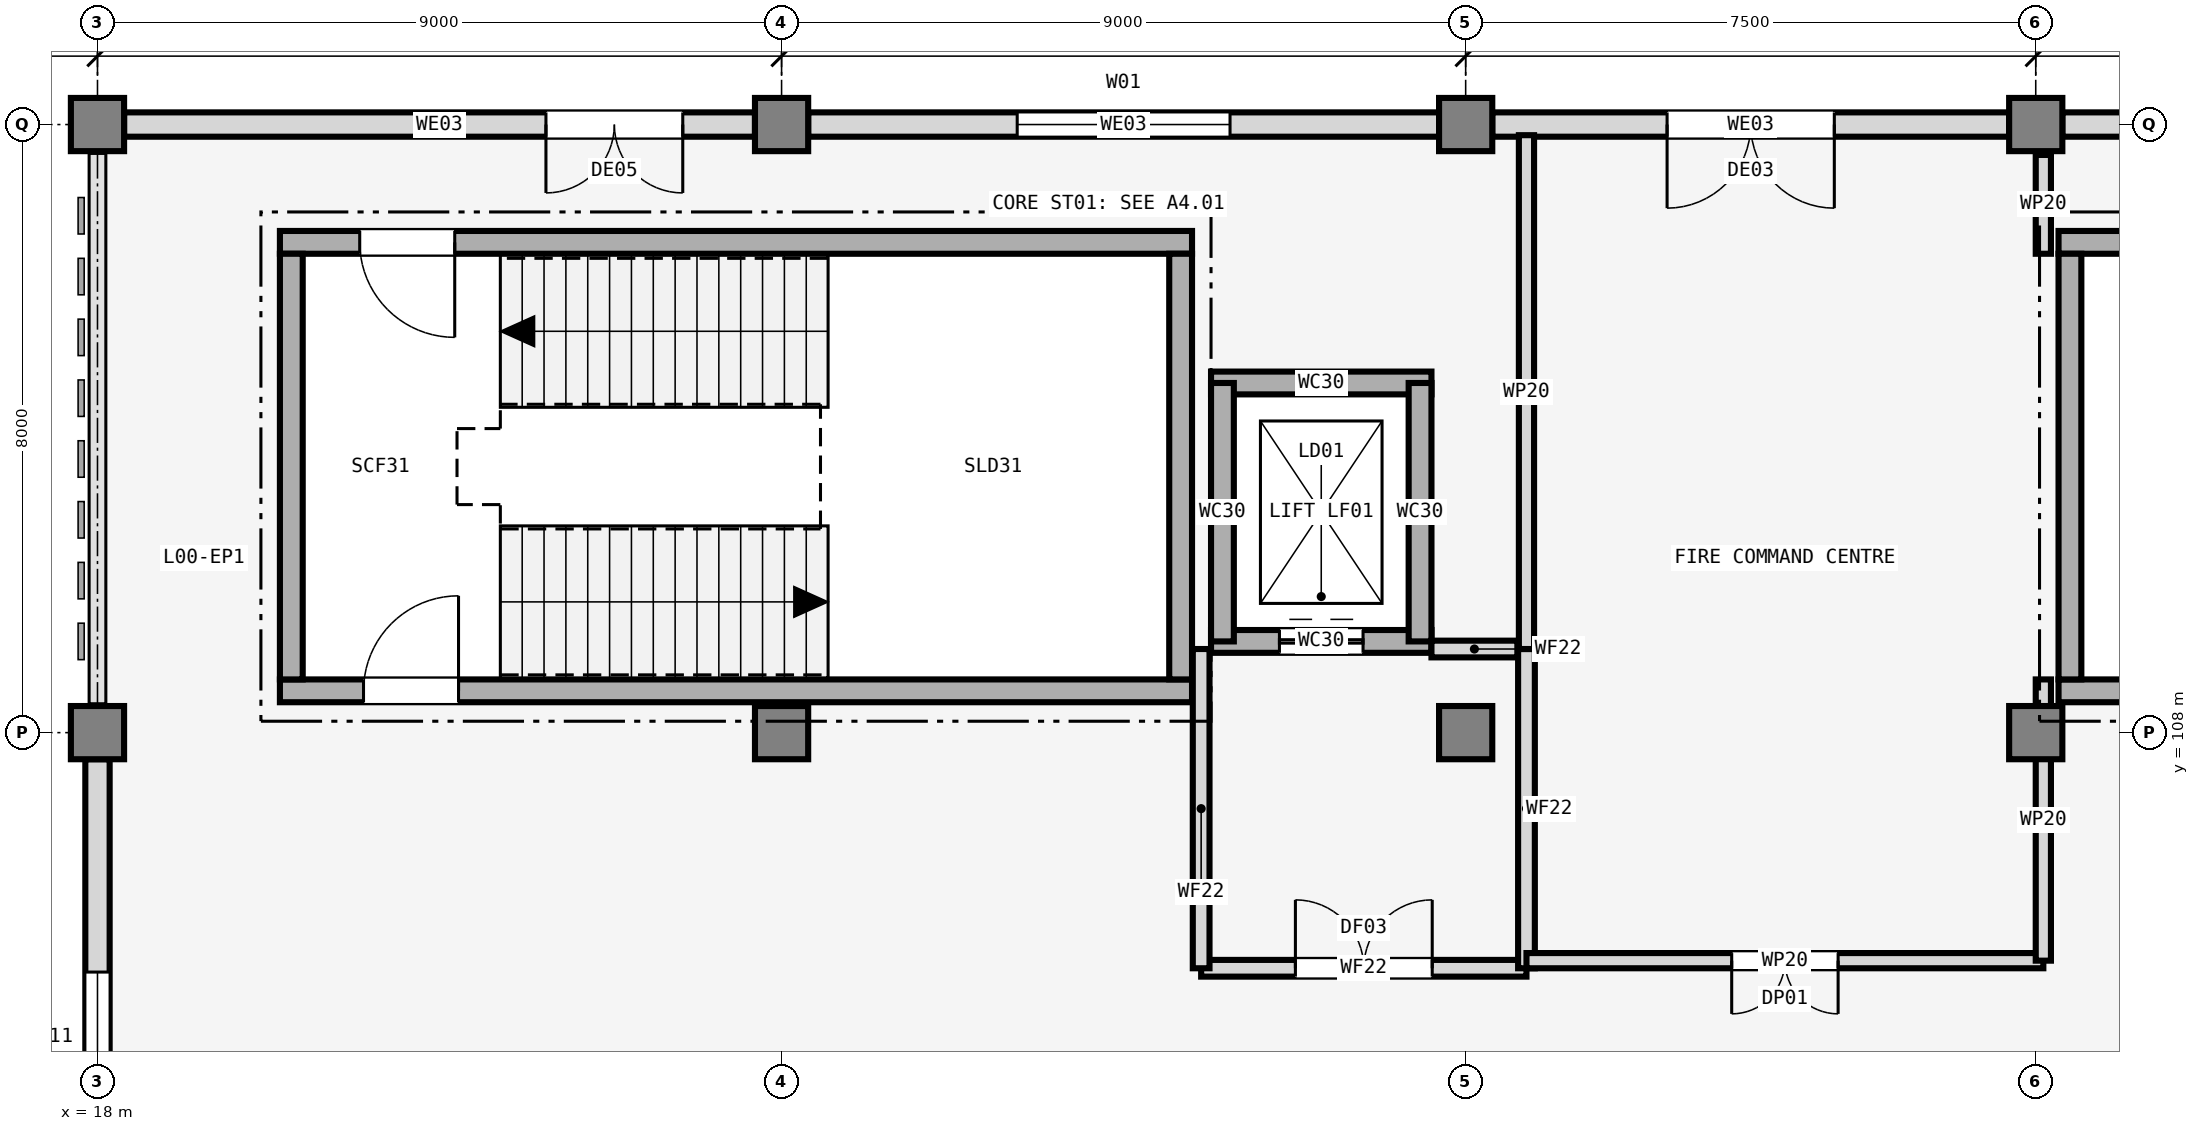
"""IFC4 building model, lengths in metres.
Left out: names, types, materials, properties, quantities, classifications, styles, units other than length and angle.
Written with IfcOpenShell. Run it as: python <this file> out.ifc"""

import sys

from ifc_helpers import new_model, si_unit, direction, frame, frame_2d, origin, origin_2d, place, context, subcontext, project, spatial, rectangle, extrude, element, fill, save


model = new_model("IFC4")
c1 = context("Model", 3, precision=1e-05, world=origin(), true_north=direction((0.0, 1.0)))
c2 = subcontext(c1, "Body", "Model", "MODEL_VIEW")
j1 = project(units=[si_unit("LENGTHUNIT", "METRE"), si_unit("PLANEANGLEUNIT", "RADIAN")], contexts=[c1])
p1 = place(None, origin())
s1 = spatial("IfcSite", under=j1, at=p1, CompositionType="ELEMENT")
p2 = place(p1, origin())
s2 = spatial("IfcBuilding", under=s1, at=p2, CompositionType="ELEMENT")
p3 = place(p2, origin())
s3 = spatial("IfcBuildingStorey", under=s2, at=p3, CompositionType="ELEMENT", Elevation=0.0)
for number, where, z_axis, x_axis in (
    (1, (18.0, 108.0, 0.0), (0.0, 0.0, 1.0), (1.0, 0.0, 0.0)),
    (2, (18.0, 116.0, 0.0), (0.0, 0.0, 1.0), (1.0, 0.0, 0.0)),
    (3, (27.0, 108.0, 0.0), (0.0, 0.0, 1.0), (1.0, 0.0, 0.0)),
    (4, (27.0, 116.0, 0.0), (0.0, 0.0, 1.0), (1.0, 0.0, 0.0)),
    (5, (36.0, 108.0, 0.0), (0.0, 0.0, 1.0), (1.0, 0.0, 0.0)),
    (6, (36.0, 116.0, 0.0), (0.0, 0.0, 1.0), (1.0, 0.0, 0.0)),
    (7, (43.5, 108.0, 0.0), (0.0, 0.0, 1.0), (1.0, 0.0, 0.0)),
    (8, (43.5, 116.0, 0.0), (0.0, 0.0, 1.0), (1.0, 0.0, 0.0)),
):
    element("IfcColumn", number, at=place(p3, frame(where, z_axis=z_axis, x_axis=x_axis)), inside=s3, PredefinedType="COLUMN", context=c2, shape_type="SweptSolid", body=[
        extrude(rectangle(XDim=0.7, YDim=0.7, at=origin_2d()), origin(), (0.0, 0.0, 1.0), 4.8),
    ])
p4 = place(p3, frame((26.65, 116.0, 0.0), z_axis=(0.0, 0.0, 1.0), x_axis=(-1.0, 0.0, 0.0)))
e9 = element("IfcWall", 9, at=p4, inside=s3, PredefinedType="SOLIDWALL", context=c2, shape_type="SweptSolid", body=[
    extrude(rectangle(XDim=8.3, YDim=0.32, at=frame_2d((4.15, 0.0))), origin(), (0.0, 0.0, 1.0), 3.93),
])
p5 = place(p4, frame((0.95, 0.0, 0.0)))
e10 = element("IfcOpeningElement", 10, at=p5, cuts=e9, PredefinedType="OPENING", context=c2, shape_type="SweptSolid", body=[
    extrude(rectangle(XDim=1.8, YDim=2.2, at=frame_2d((0.9, 1.1))), frame((0.0, 0.17, 0.0), z_axis=(0.0, -1.0, 0.0), x_axis=(1.0, 0.0, 0.0)), (0.0, 0.0, 1.0), 0.34),
])
p6 = place(p3, frame((35.65, 116.0, 0.0), z_axis=(0.0, 0.0, 1.0), x_axis=(-1.0, 0.0, 0.0)))
e11 = element("IfcWall", 11, at=p6, inside=s3, PredefinedType="SOLIDWALL", context=c2, shape_type="SweptSolid", body=[
    extrude(rectangle(XDim=8.3, YDim=0.32, at=frame_2d((4.15, 0.0))), origin(), (0.0, 0.0, 1.0), 3.93),
])
p7 = place(p6, frame((2.75, 0.0, 0.95)))
e12 = element("IfcOpeningElement", 12, at=p7, cuts=e11, PredefinedType="OPENING", context=c2, shape_type="SweptSolid", body=[
    extrude(rectangle(XDim=2.8, YDim=1.85, at=frame_2d((1.4, 0.925))), frame((0.0, 0.17, 0.0), z_axis=(0.0, -1.0, 0.0), x_axis=(1.0, 0.0, 0.0)), (0.0, 0.0, 1.0), 0.34),
])
p8 = place(p3, frame((43.15, 116.0, 0.0), z_axis=(0.0, 0.0, 1.0), x_axis=(-1.0, 0.0, 0.0)))
e13 = element("IfcWall", 13, at=p8, inside=s3, PredefinedType="SOLIDWALL", context=c2, shape_type="SweptSolid", body=[
    extrude(rectangle(XDim=6.8, YDim=0.32, at=frame_2d((3.4, 0.0))), origin(), (0.0, 0.0, 1.0), 3.93),
])
p9 = place(p8, frame((2.3, 0.0, 0.0)))
e14 = element("IfcOpeningElement", 14, at=p9, cuts=e13, PredefinedType="OPENING", context=c2, shape_type="SweptSolid", body=[
    extrude(rectangle(XDim=2.2, YDim=2.35, at=frame_2d((1.1, 1.175))), frame((0.0, 0.17, 0.0), z_axis=(0.0, -1.0, 0.0), x_axis=(1.0, 0.0, 0.0)), (0.0, 0.0, 1.0), 0.34),
])
p10 = place(p3, frame((50.65, 116.0, 0.0), z_axis=(0.0, 0.0, 1.0), x_axis=(-1.0, 0.0, 0.0)))
e15 = element("IfcWall", 15, at=p10, inside=s3, PredefinedType="SOLIDWALL", context=c2, shape_type="SweptSolid", body=[
    extrude(rectangle(XDim=6.8, YDim=0.32, at=frame_2d((3.4, 0.0))), origin(), (0.0, 0.0, 1.0), 3.93),
])
p11 = place(p10, frame((2.2, 0.0, 0.95)))
e16 = element("IfcOpeningElement", 16, at=p11, cuts=e15, PredefinedType="OPENING", context=c2, shape_type="SweptSolid", body=[
    extrude(rectangle(XDim=2.4, YDim=1.6, at=frame_2d((1.2, 0.8))), frame((0.0, 0.17, 0.0), z_axis=(0.0, -1.0, 0.0), x_axis=(1.0, 0.0, 0.0)), (0.0, 0.0, 1.0), 0.34),
])
p12 = place(p3, frame((18.0, 107.65, 0.0), z_axis=(0.0, 0.0, 1.0), x_axis=(0.0, -1.0, 0.0)))
e17 = element("IfcWall", 17, at=p12, inside=s3, PredefinedType="SOLIDWALL", context=c2, shape_type="SweptSolid", body=[
    extrude(rectangle(XDim=7.3, YDim=0.32, at=frame_2d((3.65, 0.0))), origin(), (0.0, 0.0, 1.0), 3.73),
])
p13 = place(p12, frame((2.8, 0.0, 0.95)))
e18 = element("IfcOpeningElement", 18, at=p13, cuts=e17, PredefinedType="OPENING", context=c2, shape_type="SweptSolid", body=[
    extrude(rectangle(XDim=1.7, YDim=1.55, at=frame_2d((0.85, 0.775))), frame((0.0, 0.17, 0.0), z_axis=(0.0, -1.0, 0.0), x_axis=(1.0, 0.0, 0.0)), (0.0, 0.0, 1.0), 0.34),
])
p14 = place(p3, frame((20.4, 108.55, 0.0), z_axis=(0.0, 0.0, 1.0), x_axis=(1.0, 0.0, 0.0)))
e19 = element("IfcWall", 19, at=p14, inside=s3, PredefinedType="SHEAR", context=c2, shape_type="SweptSolid", body=[
    extrude(rectangle(XDim=12.0, YDim=0.3, at=frame_2d((6.0, 0.0))), origin(), (0.0, 0.0, 1.0), 4.8),
])
p15 = place(p14, frame((1.1, 0.0, 0.0)))
e20 = element("IfcOpeningElement", 20, at=p15, cuts=e19, PredefinedType="OPENING", context=c2, shape_type="SweptSolid", body=[
    extrude(rectangle(XDim=1.25, YDim=2.15, at=frame_2d((0.625, 1.075))), frame((0.0, 0.16, 0.0), z_axis=(0.0, -1.0, 0.0), x_axis=(1.0, 0.0, 0.0)), (0.0, 0.0, 1.0), 0.32),
])
p16 = place(p3, frame((32.4, 114.45, 0.0), z_axis=(0.0, 0.0, 1.0), x_axis=(-1.0, 0.0, 0.0)))
e21 = element("IfcWall", 21, at=p16, inside=s3, PredefinedType="SHEAR", context=c2, shape_type="SweptSolid", body=[
    extrude(rectangle(XDim=12.0, YDim=0.3, at=frame_2d((6.0, 0.0))), origin(), (0.0, 0.0, 1.0), 4.8),
])
p17 = place(p16, frame((9.7, 0.0, 0.0)))
e22 = element("IfcOpeningElement", 22, at=p17, cuts=e21, PredefinedType="OPENING", context=c2, shape_type="SweptSolid", body=[
    extrude(rectangle(XDim=1.25, YDim=2.15, at=frame_2d((0.625, 1.075))), frame((0.0, 0.16, 0.0), z_axis=(0.0, -1.0, 0.0), x_axis=(1.0, 0.0, 0.0)), (0.0, 0.0, 1.0), 0.32),
])
for number, where, z_axis, x_axis in (
    (23, (20.55, 114.3, 0.0), (0.0, 0.0, 1.0), (0.0, -1.0, 0.0)),
    (24, (32.25, 108.7, 0.0), (0.0, 0.0, 1.0), (0.0, 1.0, 0.0)),
):
    element("IfcWall", number, at=place(p3, frame(where, z_axis=z_axis, x_axis=x_axis)), inside=s3, PredefinedType="SHEAR", context=c2, shape_type="SweptSolid", body=[
        extrude(rectangle(XDim=5.6, YDim=0.3, at=frame_2d((2.8, 0.0))), origin(), (0.0, 0.0, 1.0), 4.8),
    ])
p18 = place(p3, frame((43.8, 108.55, 0.0), z_axis=(0.0, 0.0, 1.0), x_axis=(1.0, 0.0, 0.0)))
e25 = element("IfcWall", 25, at=p18, inside=s3, PredefinedType="SHEAR", context=c2, shape_type="SweptSolid", body=[
    extrude(rectangle(XDim=12.0, YDim=0.3, at=frame_2d((6.0, 0.0))), origin(), (0.0, 0.0, 1.0), 4.8),
])
p19 = place(p18, frame((1.1, 0.0, 0.0)))
e26 = element("IfcOpeningElement", 26, at=p19, cuts=e25, PredefinedType="OPENING", context=c2, shape_type="SweptSolid", body=[
    extrude(rectangle(XDim=1.25, YDim=2.15, at=frame_2d((0.625, 1.075))), frame((0.0, 0.16, 0.0), z_axis=(0.0, -1.0, 0.0), x_axis=(1.0, 0.0, 0.0)), (0.0, 0.0, 1.0), 0.32),
])
p20 = place(p3, frame((55.8, 114.45, 0.0), z_axis=(0.0, 0.0, 1.0), x_axis=(-1.0, 0.0, 0.0)))
e27 = element("IfcWall", 27, at=p20, inside=s3, PredefinedType="SHEAR", context=c2, shape_type="SweptSolid", body=[
    extrude(rectangle(XDim=12.0, YDim=0.3, at=frame_2d((6.0, 0.0))), origin(), (0.0, 0.0, 1.0), 4.8),
])
p21 = place(p20, frame((9.7, 0.0, 0.0)))
e28 = element("IfcOpeningElement", 28, at=p21, cuts=e27, PredefinedType="OPENING", context=c2, shape_type="SweptSolid", body=[
    extrude(rectangle(XDim=1.25, YDim=2.15, at=frame_2d((0.625, 1.075))), frame((0.0, 0.16, 0.0), z_axis=(0.0, -1.0, 0.0), x_axis=(1.0, 0.0, 0.0)), (0.0, 0.0, 1.0), 0.32),
])
p22 = place(p3, frame((43.95, 114.3, 0.0), z_axis=(0.0, 0.0, 1.0), x_axis=(0.0, -1.0, 0.0)))
e29 = element("IfcWall", 29, at=p22, inside=s3, PredefinedType="SHEAR", context=c2, shape_type="SweptSolid", body=[
    extrude(rectangle(XDim=5.6, YDim=0.3, at=frame_2d((2.8, 0.0))), origin(), (0.0, 0.0, 1.0), 4.8),
])
p23 = place(p3, frame((32.65, 109.2, 0.0), z_axis=(0.0, 0.0, 1.0), x_axis=(1.0, 0.0, 0.0)))
e30 = element("IfcWall", 30, at=p23, inside=s3, PredefinedType="SHEAR", context=c2, shape_type="SweptSolid", body=[
    extrude(rectangle(XDim=2.9, YDim=0.3, at=frame_2d((1.45, 0.0))), origin(), (0.0, 0.0, 1.0), 4.8),
])
p24 = place(p23, frame((0.9, 0.0, 0.0)))
e31 = element("IfcOpeningElement", 31, at=p24, cuts=e30, PredefinedType="OPENING", context=c2, shape_type="SweptSolid", body=[
    extrude(rectangle(XDim=1.1, YDim=2.15, at=frame_2d((0.55, 1.075))), frame((0.0, 0.16, 0.0), z_axis=(0.0, -1.0, 0.0), x_axis=(1.0, 0.0, 0.0)), (0.0, 0.0, 1.0), 0.32),
])
p25 = place(p3, frame((35.55, 112.6, 0.0), z_axis=(0.0, 0.0, 1.0), x_axis=(-1.0, 0.0, 0.0)))
e32 = element("IfcWall", 32, at=p25, inside=s3, PredefinedType="SHEAR", context=c2, shape_type="SweptSolid", body=[
    extrude(rectangle(XDim=2.9, YDim=0.3, at=frame_2d((1.45, 0.0))), origin(), (0.0, 0.0, 1.0), 4.8),
])
for number, where, z_axis, x_axis in (
    (33, (32.8, 112.6, 0.0), (0.0, 0.0, 1.0), (0.0, -1.0, 0.0)),
    (34, (35.4, 109.2, 0.0), (0.0, 0.0, 1.0), (0.0, 1.0, 0.0)),
):
    element("IfcWall", number, at=place(p3, frame(where, z_axis=z_axis, x_axis=x_axis)), inside=s3, PredefinedType="SHEAR", context=c2, shape_type="SweptSolid", body=[
        extrude(rectangle(XDim=3.4, YDim=0.3, at=frame_2d((1.7, 0.0))), origin(), (0.0, 0.0, 1.0), 4.8),
    ])
p26 = place(p3, frame((32.52, 104.9, 0.0), z_axis=(0.0, 0.0, 1.0), x_axis=(1.0, 0.0, 0.0)))
e35 = element("IfcWall", 35, at=p26, inside=s3, PredefinedType="SOLIDWALL", context=c2, shape_type="SweptSolid", body=[
    extrude(rectangle(XDim=4.28, YDim=0.22, at=frame_2d((2.14, 0.0))), origin(), (0.0, 0.0, 1.0), 3.68),
])
p27 = place(p26, frame((1.24, 0.0, 0.0)))
e36 = element("IfcOpeningElement", 36, at=p27, cuts=e35, PredefinedType="OPENING", context=c2, shape_type="SweptSolid", body=[
    extrude(rectangle(XDim=1.8, YDim=2.2, at=frame_2d((0.9, 1.1))), frame((0.0, 0.12, 0.0), z_axis=(0.0, -1.0, 0.0), x_axis=(1.0, 0.0, 0.0)), (0.0, 0.0, 1.0), 0.24),
])
for number, where, z_axis, x_axis in (
    (37, (32.52, 104.9, 0.0), (0.0, 0.0, 1.0), (0.0, 1.0, 0.0)),
    (38, (36.8, 104.9, 0.0), (0.0, 0.0, 1.0), (0.0, 1.0, 0.0)),
):
    element("IfcWall", number, at=place(p3, frame(where, z_axis=z_axis, x_axis=x_axis)), inside=s3, PredefinedType="SOLIDWALL", context=c2, shape_type="SweptSolid", body=[
        extrude(rectangle(XDim=4.2, YDim=0.22, at=frame_2d((2.1, 0.0))), origin(), (0.0, 0.0, 1.0), 3.68),
    ])
p28 = place(p3, frame((35.55, 109.1, 0.0), z_axis=(0.0, 0.0, 1.0), x_axis=(1.0, 0.0, 0.0)))
e39 = element("IfcWall", 39, at=p28, inside=s3, PredefinedType="SOLIDWALL", context=c2, shape_type="SweptSolid", body=[
    extrude(rectangle(XDim=1.13, YDim=0.22, at=frame_2d((0.565, 0.0))), origin(), (0.0, 0.0, 1.0), 3.68),
])
p29 = place(p3, frame((43.6, 105.0, 0.0), z_axis=(0.0, 0.0, 1.0), x_axis=(-1.0, 0.0, 0.0)))
e40 = element("IfcWall", 40, at=p29, inside=s3, PredefinedType="PARTITIONING", context=c2, shape_type="SweptSolid", body=[
    extrude(rectangle(XDim=6.8, YDim=0.2, at=frame_2d((3.4, 0.0))), origin(), (0.0, 0.0, 1.0), 3.68),
])
p30 = place(p29, frame((2.7, 0.0, 0.0)))
e41 = element("IfcOpeningElement", 41, at=p30, cuts=e40, PredefinedType="OPENING", context=c2, shape_type="SweptSolid", body=[
    extrude(rectangle(XDim=1.4, YDim=2.2, at=frame_2d((0.7, 1.1))), frame((0.0, 0.11, 0.0), z_axis=(0.0, -1.0, 0.0), x_axis=(1.0, 0.0, 0.0)), (0.0, 0.0, 1.0), 0.22),
])
p31 = place(p3, frame((43.6, 108.7, 0.0), z_axis=(0.0, 0.0, 1.0), x_axis=(0.0, -1.0, 0.0)))
e42 = element("IfcWall", 42, at=p31, inside=s3, PredefinedType="PARTITIONING", context=c2, shape_type="SweptSolid", body=[
    extrude(rectangle(XDim=3.7, YDim=0.2, at=frame_2d((1.85, 0.0))), origin(), (0.0, 0.0, 1.0), 3.68),
])
p32 = place(p3, frame((36.8, 109.1, 0.0), z_axis=(0.0, 0.0, 1.0), x_axis=(0.0, 1.0, 0.0)))
e43 = element("IfcWall", 43, at=p32, inside=s3, PredefinedType="PARTITIONING", context=c2, shape_type="SweptSolid", body=[
    extrude(rectangle(XDim=6.76, YDim=0.2, at=frame_2d((3.38, 0.0))), origin(), (0.0, 0.0, 1.0), 3.68),
])
p33 = place(p3, frame((43.6, 115.6, 0.0), z_axis=(0.0, 0.0, 1.0), x_axis=(0.0, -1.0, 0.0)))
e44 = element("IfcWall", 44, at=p33, inside=s3, PredefinedType="PARTITIONING", context=c2, shape_type="SweptSolid", body=[
    extrude(rectangle(XDim=1.3, YDim=0.2, at=frame_2d((0.65, 0.0))), origin(), (0.0, 0.0, 1.0), 3.68),
])
p34 = place(p5, frame((1.8, 0.0, 0.0), z_axis=(0.0, 0.0, 1.0), x_axis=(-1.0, 0.0, 0.0)))
e45 = element("IfcDoor", 45, at=p34, inside=s3, OperationType="DOUBLE_DOOR_SINGLE_SWING", PredefinedType="DOOR", context=c2, shape_type="SweptSolid", body=[
    extrude(rectangle(XDim=1.8, YDim=2.2, at=frame_2d((0.9, 1.1))), frame((0.0, 0.025, 0.0), z_axis=(0.0, -1.0, 0.0), x_axis=(1.0, 0.0, 0.0)), (0.0, 0.0, 1.0), 0.05),
])
fill(e10, e45)
p35 = place(p7, origin())
e46 = element("IfcWindow", 46, at=p35, inside=s3, PartitioningType="SINGLE_PANEL", PredefinedType="WINDOW", context=c2, shape_type="SweptSolid", body=[
    extrude(rectangle(XDim=2.8, YDim=1.85, at=frame_2d((1.4, 0.925))), frame((0.0, 0.03, 0.0), z_axis=(0.0, -1.0, 0.0), x_axis=(1.0, 0.0, 0.0)), (0.0, 0.0, 1.0), 0.06),
])
fill(e12, e46)
p36 = place(p9, frame((2.2, 0.0, 0.0), z_axis=(0.0, 0.0, 1.0), x_axis=(-1.0, 0.0, 0.0)))
e47 = element("IfcDoor", 47, at=p36, inside=s3, OperationType="DOUBLE_DOOR_SINGLE_SWING", PredefinedType="DOOR", context=c2, shape_type="SweptSolid", body=[
    extrude(rectangle(XDim=2.2, YDim=2.35, at=frame_2d((1.1, 1.175))), frame((0.0, 0.025, 0.0), z_axis=(0.0, -1.0, 0.0), x_axis=(1.0, 0.0, 0.0)), (0.0, 0.0, 1.0), 0.05),
])
fill(e14, e47)
p37 = place(p13, origin())
e48 = element("IfcWindow", 48, at=p37, inside=s3, PartitioningType="SINGLE_PANEL", PredefinedType="WINDOW", context=c2, shape_type="SweptSolid", body=[
    extrude(rectangle(XDim=1.7, YDim=1.55, at=frame_2d((0.85, 0.775))), frame((0.0, 0.03, 0.0), z_axis=(0.0, -1.0, 0.0), x_axis=(1.0, 0.0, 0.0)), (0.0, 0.0, 1.0), 0.06),
])
fill(e18, e48)
p38 = place(p15, origin())
e49 = element("IfcDoor", 49, at=p38, inside=s3, OperationType="SINGLE_SWING_RIGHT", PredefinedType="DOOR", context=c2, shape_type="SweptSolid", body=[
    extrude(rectangle(XDim=1.25, YDim=2.15, at=frame_2d((0.625, 1.075))), frame((0.0, 0.025, 0.0), z_axis=(0.0, -1.0, 0.0), x_axis=(1.0, 0.0, 0.0)), (0.0, 0.0, 1.0), 0.05),
])
fill(e20, e49)
p39 = place(p17, origin())
e50 = element("IfcDoor", 50, at=p39, inside=s3, OperationType="SINGLE_SWING_LEFT", PredefinedType="DOOR", context=c2, shape_type="SweptSolid", body=[
    extrude(rectangle(XDim=1.25, YDim=2.15, at=frame_2d((0.625, 1.075))), frame((0.0, 0.025, 0.0), z_axis=(0.0, -1.0, 0.0), x_axis=(1.0, 0.0, 0.0)), (0.0, 0.0, 1.0), 0.05),
])
fill(e22, e50)
p40 = place(p24, origin())
e51 = element("IfcDoor", 51, at=p40, inside=s3, OperationType="DOUBLE_DOOR_SLIDING", PredefinedType="DOOR", context=c2, shape_type="SweptSolid", body=[
    extrude(rectangle(XDim=1.1, YDim=2.15, at=frame_2d((0.55, 1.075))), frame((0.0, 0.025, 0.0), z_axis=(0.0, -1.0, 0.0), x_axis=(1.0, 0.0, 0.0)), (0.0, 0.0, 1.0), 0.05),
])
fill(e31, e51)
p41 = place(p27, origin())
e52 = element("IfcDoor", 52, at=p41, inside=s3, OperationType="DOUBLE_DOOR_SINGLE_SWING", PredefinedType="DOOR", context=c2, shape_type="SweptSolid", body=[
    extrude(rectangle(XDim=1.8, YDim=2.2, at=frame_2d((0.9, 1.1))), frame((0.0, 0.025, 0.0), z_axis=(0.0, -1.0, 0.0), x_axis=(1.0, 0.0, 0.0)), (0.0, 0.0, 1.0), 0.05),
])
fill(e36, e52)
p42 = place(p30, origin())
e53 = element("IfcDoor", 53, at=p42, inside=s3, OperationType="DOUBLE_DOOR_SINGLE_SWING", PredefinedType="DOOR", context=c2, shape_type="SweptSolid", body=[
    extrude(rectangle(XDim=1.4, YDim=2.2, at=frame_2d((0.7, 1.1))), frame((0.0, 0.025, 0.0), z_axis=(0.0, -1.0, 0.0), x_axis=(1.0, 0.0, 0.0)), (0.0, 0.0, 1.0), 0.05),
])
fill(e41, e53)
save(model, sys.argv[1])
